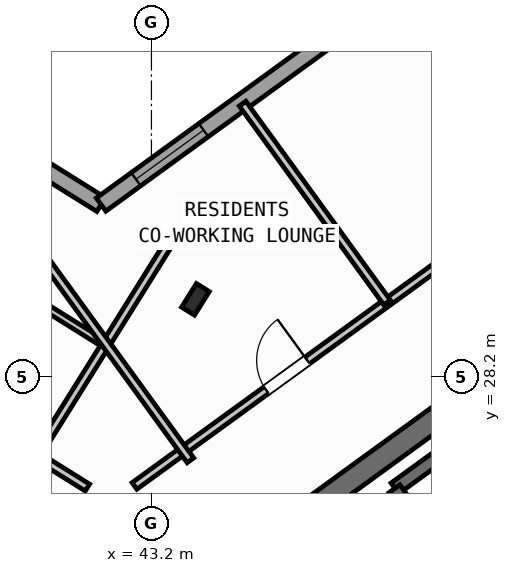
"""IFC4 building model, lengths in metres.
Left out: names, types, materials, properties, quantities, classifications, styles, units other than length and angle.
Written with IfcOpenShell. Run it as: python <this file> out.ifc"""

import sys

from ifc_helpers import new_model, si_unit, direction, frame, frame_2d, origin, origin_2d, place, context, subcontext, project, spatial, rectangle, i_section, extrude, source, transform, mapped, element, fill, save


model = new_model("IFC4")
c1 = context("Model", 3, precision=1e-05, world=origin(), true_north=direction((0.0, 1.0)))
c2 = subcontext(c1, "Body", "Model", "MODEL_VIEW")
j1 = project(units=[si_unit("LENGTHUNIT", "METRE"), si_unit("PLANEANGLEUNIT", "RADIAN")], contexts=[c1])
p1 = place(None, origin())
s1 = spatial("IfcSite", under=j1, at=p1, CompositionType="ELEMENT")
p2 = place(p1, origin())
s2 = spatial("IfcBuilding", under=s1, at=p2, CompositionType="ELEMENT")
p3 = place(p2, frame((0.0, 0.0, 211.2)))
s3 = spatial("IfcBuildingStorey", under=s2, at=p3, CompositionType="ELEMENT", Elevation=211.2)
p4 = place(p3, frame((44.406, 24.172, 0.0), z_axis=(0.0, 0.0, 1.0), x_axis=(0.809012867805, 0.587790931986, 0.0)))
e1 = element("IfcWall", 1, at=p4, inside=s3, PredefinedType="SHEAR", context=c2, shape_type="SweptSolid", body=[
    extrude(rectangle(XDim=12.24, YDim=0.45, at=frame_2d((6.12, 0.0))), origin(), (0.0, 0.0, 1.0), 3.35),
])
m1 = source(origin(), c2, "Body", "SweptSolid", [
    extrude(i_section(OverallWidth=0.3, OverallDepth=0.55, WebThickness=0.015, FlangeThickness=0.029, at=origin_2d()), origin(), (0.0, 0.0, 1.0), 3.6),
])
p5 = place(p3, frame((44.068, 29.726, 0.0), z_axis=(0.0, 0.0, 1.0), x_axis=(-0.848048096156, 0.529919264233, 0.0)))
e2 = element("IfcColumn", 2, at=p5, inside=s3, PredefinedType="COLUMN", context=c2, shape_type="MappedRepresentation", body=[
    mapped(m1, transform((0.0, 0.0, 0.0), scale=1.0)),
])
p6 = place(p3, frame((17.424, 47.083, 0.0), z_axis=(0.0, 0.0, 1.0), x_axis=(0.848049927979, -0.529916332693, 0.0)))
e3 = element("IfcWall", 3, at=p6, inside=s3, PredefinedType="STANDARD", context=c2, shape_type="SweptSolid", body=[
    extrude(rectangle(XDim=29.223, YDim=0.32, at=frame_2d((14.612, 0.0))), origin(), (0.0, 0.0, 1.0), 3.35),
])
p7 = place(p6, frame((2.526, 0.0, 0.0)))
e4 = element("IfcOpeningElement", 4, at=p7, cuts=e3, PredefinedType="OPENING", context=c2, shape_type="SweptSolid", body=[
    extrude(rectangle(XDim=1.05, YDim=2.15, at=frame_2d((0.525, 1.075))), frame((0.0, 0.17, 0.0), z_axis=(0.0, -1.0, 0.0), x_axis=(1.0, 0.0, 0.0)), (0.0, 0.0, 1.0), 0.34),
])
p8 = place(p6, frame((0.653, 0.0, 0.9)))
e5 = element("IfcOpeningElement", 5, at=p8, cuts=e3, PredefinedType="OPENING", context=c2, shape_type="SweptSolid", body=[
    extrude(rectangle(XDim=1.35, YDim=1.45, at=frame_2d((0.675, 0.725))), frame((0.0, 0.17, 0.0), z_axis=(0.0, -1.0, 0.0), x_axis=(1.0, 0.0, 0.0)), (0.0, 0.0, 1.0), 0.34),
])
p9 = place(p6, frame((6.897, 0.0, 1.0)))
e6 = element("IfcOpeningElement", 6, at=p9, cuts=e3, PredefinedType="OPENING", context=c2, shape_type="SweptSolid", body=[
    extrude(rectangle(XDim=0.9, YDim=1.25, at=frame_2d((0.45, 0.625))), frame((0.0, 0.17, 0.0), z_axis=(0.0, -1.0, 0.0), x_axis=(1.0, 0.0, 0.0)), (0.0, 0.0, 1.0), 0.34),
])
p10 = place(p6, frame((9.602, 0.0, 0.95)))
e7 = element("IfcOpeningElement", 7, at=p10, cuts=e3, PredefinedType="OPENING", context=c2, shape_type="SweptSolid", body=[
    extrude(rectangle(XDim=1.95, YDim=1.35, at=frame_2d((0.975, 0.675))), frame((0.0, 0.17, 0.0), z_axis=(0.0, -1.0, 0.0), x_axis=(1.0, 0.0, 0.0)), (0.0, 0.0, 1.0), 0.34),
])
p11 = place(p6, frame((14.096, 0.0, 1.0)))
e8 = element("IfcOpeningElement", 8, at=p11, cuts=e3, PredefinedType="OPENING", context=c2, shape_type="SweptSolid", body=[
    extrude(rectangle(XDim=0.9, YDim=1.25, at=frame_2d((0.45, 0.625))), frame((0.0, 0.17, 0.0), z_axis=(0.0, -1.0, 0.0), x_axis=(1.0, 0.0, 0.0)), (0.0, 0.0, 1.0), 0.34),
])
p12 = place(p6, frame((17.254, 0.0, 1.0)))
e9 = element("IfcOpeningElement", 9, at=p12, cuts=e3, PredefinedType="OPENING", context=c2, shape_type="SweptSolid", body=[
    extrude(rectangle(XDim=0.9, YDim=1.25, at=frame_2d((0.45, 0.625))), frame((0.0, 0.17, 0.0), z_axis=(0.0, -1.0, 0.0), x_axis=(1.0, 0.0, 0.0)), (0.0, 0.0, 1.0), 0.34),
])
p13 = place(p6, frame((21.139, 0.0, 0.9)))
e10 = element("IfcOpeningElement", 10, at=p13, cuts=e3, PredefinedType="OPENING", context=c2, shape_type="SweptSolid", body=[
    extrude(rectangle(XDim=1.35, YDim=1.45, at=frame_2d((0.675, 0.725))), frame((0.0, 0.17, 0.0), z_axis=(0.0, -1.0, 0.0), x_axis=(1.0, 0.0, 0.0)), (0.0, 0.0, 1.0), 0.34),
])
p14 = place(p6, frame((25.778, 0.0, 0.9)))
e11 = element("IfcOpeningElement", 11, at=p14, cuts=e3, PredefinedType="OPENING", context=c2, shape_type="SweptSolid", body=[
    extrude(rectangle(XDim=1.35, YDim=1.45, at=frame_2d((0.675, 0.725))), frame((0.0, 0.17, 0.0), z_axis=(0.0, -1.0, 0.0), x_axis=(1.0, 0.0, 0.0)), (0.0, 0.0, 1.0), 0.34),
])
p15 = place(p3, frame((42.207, 31.597, 0.0), z_axis=(0.0, 0.0, 1.0), x_axis=(0.809020333377, 0.587780656523, 0.0)))
e12 = element("IfcWall", 12, at=p15, inside=s3, PredefinedType="STANDARD", context=c2, shape_type="SweptSolid", body=[
    extrude(rectangle(XDim=15.223, YDim=0.32, at=frame_2d((7.611, 0.0))), origin(), (0.0, 0.0, 1.0), 3.35),
])
p16 = place(p15, frame((12.82, 0.0, 0.0)))
e13 = element("IfcOpeningElement", 13, at=p16, cuts=e12, PredefinedType="OPENING", context=c2, shape_type="SweptSolid", body=[
    extrude(rectangle(XDim=1.05, YDim=2.15, at=frame_2d((0.525, 1.075))), frame((0.0, 0.17, 0.0), z_axis=(0.0, -1.0, 0.0), x_axis=(1.0, 0.0, 0.0)), (0.0, 0.0, 1.0), 0.34),
])
p17 = place(p15, frame((0.85, 0.0, 0.9)))
e14 = element("IfcOpeningElement", 14, at=p17, cuts=e12, PredefinedType="OPENING", context=c2, shape_type="SweptSolid", body=[
    extrude(rectangle(XDim=1.65, YDim=1.45, at=frame_2d((0.825, 0.725))), frame((0.0, 0.17, 0.0), z_axis=(0.0, -1.0, 0.0), x_axis=(1.0, 0.0, 0.0)), (0.0, 0.0, 1.0), 0.34),
])
p18 = place(p15, frame((5.769, 0.0, 0.9)))
e15 = element("IfcOpeningElement", 15, at=p18, cuts=e12, PredefinedType="OPENING", context=c2, shape_type="SweptSolid", body=[
    extrude(rectangle(XDim=1.35, YDim=1.45, at=frame_2d((0.675, 0.725))), frame((0.0, 0.17, 0.0), z_axis=(0.0, -1.0, 0.0), x_axis=(1.0, 0.0, 0.0)), (0.0, 0.0, 1.0), 0.34),
])
p19 = place(p15, frame((10.219, 0.0, 1.0)))
e16 = element("IfcOpeningElement", 16, at=p19, cuts=e12, PredefinedType="OPENING", context=c2, shape_type="SweptSolid", body=[
    extrude(rectangle(XDim=0.9, YDim=1.25, at=frame_2d((0.45, 0.625))), frame((0.0, 0.17, 0.0), z_axis=(0.0, -1.0, 0.0), x_axis=(1.0, 0.0, 0.0)), (0.0, 0.0, 1.0), 0.34),
])
p20 = place(p3, frame((48.006, 25.996, 0.0), z_axis=(0.0, 0.0, 1.0), x_axis=(0.80901903764, 0.587782439969, 0.0)))
e17 = element("IfcWall", 17, at=p20, inside=s3, PredefinedType="SHEAR", context=c2, shape_type="SweptSolid", body=[
    extrude(rectangle(XDim=7.46, YDim=0.26, at=frame_2d((3.73, 0.0))), origin(), (0.0, 0.0, 1.0), 3.35),
])
p21 = place(p3, frame((49.855, 23.434, 0.0), z_axis=(0.0, 0.0, 1.0), x_axis=(-0.58776738483, 0.809029975545, 0.0)))
e18 = element("IfcWall", 18, at=p21, inside=s3, PredefinedType="SHEAR", context=c2, shape_type="SweptSolid", body=[
    extrude(rectangle(XDim=3.16, YDim=0.26, at=frame_2d((1.58, 0.0))), origin(), (0.0, 0.0, 1.0), 3.35),
])
p22 = place(p3, frame((41.936, 26.012, 0.0), z_axis=(0.0, 0.0, 1.0), x_axis=(-0.848051154596, 0.529914369676, 0.0)))
e19 = element("IfcWall", 19, at=p22, inside=s3, PredefinedType="PARTITIONING", context=c2, shape_type="SweptSolid", body=[
    extrude(rectangle(XDim=15.57, YDim=0.16, at=frame_2d((7.785, 0.0))), origin(), (0.0, 0.0, 1.0), 3.34),
])
p23 = place(p22, frame((10.83, 0.0, 0.0)))
e20 = element("IfcOpeningElement", 20, at=p23, cuts=e19, PredefinedType="OPENING", context=c2, shape_type="SweptSolid", body=[
    extrude(rectangle(XDim=1.0, YDim=2.1, at=frame_2d((0.5, 1.05))), frame((0.0, 0.09, 0.0), z_axis=(0.0, -1.0, 0.0), x_axis=(1.0, 0.0, 0.0)), (0.0, 0.0, 1.0), 0.18),
])
p24 = place(p3, frame((43.704, 31.086, 0.0), z_axis=(0.0, 0.0, 1.0), x_axis=(-0.529906828443, -0.848055866774, 0.0)))
e21 = element("IfcWall", 21, at=p24, inside=s3, PredefinedType="PARTITIONING", context=c2, shape_type="SweptSolid", body=[
    extrude(rectangle(XDim=5.48, YDim=0.16, at=frame_2d((2.74, 0.0))), origin(), (0.0, 0.0, 1.0), 3.34),
])
p25 = place(p3, frame((42.226, 28.873, 0.0), z_axis=(0.0, 0.0, 1.0), x_axis=(-0.848049134363, 0.529917602752, 0.0)))
e22 = element("IfcWall", 22, at=p25, inside=s3, PredefinedType="PLUMBINGWALL", context=c2, shape_type="SweptSolid", body=[
    extrude(rectangle(XDim=14.3, YDim=0.14, at=frame_2d((7.15, 0.0))), origin(), (0.0, 0.0, 1.0), 3.34),
])
p26 = place(p25, frame((9.57, 0.0, 0.0)))
e23 = element("IfcOpeningElement", 23, at=p26, cuts=e22, PredefinedType="OPENING", context=c2, shape_type="SweptSolid", body=[
    extrude(rectangle(XDim=0.92, YDim=2.08, at=frame_2d((0.46, 1.04))), frame((0.0, 0.08, 0.0), z_axis=(0.0, -1.0, 0.0), x_axis=(1.0, 0.0, 0.0)), (0.0, 0.0, 1.0), 0.16),
])
p27 = place(p3, frame((42.866, 26.044, 0.0), z_axis=(0.0, 0.0, 1.0), x_axis=(0.809020254154, 0.587780765566, 0.0)))
e24 = element("IfcWall", 24, at=p27, inside=s3, PredefinedType="PARTITIONING", context=c2, shape_type="SweptSolid", body=[
    extrude(rectangle(XDim=14.67, YDim=0.16, at=frame_2d((7.335, 0.0))), origin(), (0.0, 0.0, 1.0), 3.34),
])
p28 = place(p27, frame((3.215, 0.0, 0.0)))
e25 = element("IfcOpeningElement", 25, at=p28, cuts=e24, PredefinedType="OPENING", context=c2, shape_type="SweptSolid", body=[
    extrude(rectangle(XDim=1.0, YDim=2.1, at=frame_2d((0.5, 1.05))), frame((0.0, 0.09, 0.0), z_axis=(0.0, -1.0, 0.0), x_axis=(1.0, 0.0, 0.0)), (0.0, 0.0, 1.0), 0.18),
])
p29 = place(p27, frame((9.915, 0.0, 0.0)))
e26 = element("IfcOpeningElement", 26, at=p29, cuts=e24, PredefinedType="OPENING", context=c2, shape_type="SweptSolid", body=[
    extrude(rectangle(XDim=1.0, YDim=2.1, at=frame_2d((0.5, 1.05))), frame((0.0, 0.09, 0.0), z_axis=(0.0, -1.0, 0.0), x_axis=(1.0, 0.0, 0.0)), (0.0, 0.0, 1.0), 0.18),
])
p30 = place(p3, frame((43.969, 26.55, 0.0), z_axis=(0.0, 0.0, 1.0), x_axis=(-0.587776919386, 0.80902304852, 0.0)))
e27 = element("IfcWall", 27, at=p30, inside=s3, PredefinedType="PARTITIONING", context=c2, shape_type="SweptSolid", body=[
    extrude(rectangle(XDim=5.48, YDim=0.16, at=frame_2d((2.74, 0.0))), origin(), (0.0, 0.0, 1.0), 3.34),
])
p31 = place(p3, frame((47.849, 29.665, 0.0), z_axis=(0.0, 0.0, 1.0), x_axis=(-0.587785532001, 0.809016791155, 0.0)))
e28 = element("IfcWall", 28, at=p31, inside=s3, PredefinedType="PARTITIONING", context=c2, shape_type="SweptSolid", body=[
    extrude(rectangle(XDim=4.85, YDim=0.16, at=frame_2d((2.425, 0.0))), origin(), (0.0, 0.0, 1.0), 3.34),
])
m2 = source(origin(), c2, "Body", "SweptSolid", [
    extrude(rectangle(XDim=1.65, YDim=1.45, at=frame_2d((0.825, 0.725))), frame((0.0, 0.03, 0.0), z_axis=(0.0, -1.0, 0.0), x_axis=(1.0, 0.0, 0.0)), (0.0, 0.0, 1.0), 0.06),
])
p32 = place(p17, origin())
e29 = element("IfcWindow", 29, at=p32, inside=s3, PartitioningType="SINGLE_PANEL", PredefinedType="WINDOW", context=c2, shape_type="MappedRepresentation", body=[
    mapped(m2, transform((0.0, 0.0, 0.0), scale=1.0)),
])
fill(e14, e29)
m3 = source(origin(), c2, "Body", "SweptSolid", [
    extrude(rectangle(XDim=1.0, YDim=2.1, at=frame_2d((0.5, 1.05))), frame((0.0, 0.025, 0.0), z_axis=(0.0, -1.0, 0.0), x_axis=(1.0, 0.0, 0.0)), (0.0, 0.0, 1.0), 0.05),
])
p33 = place(p28, origin())
e30 = element("IfcDoor", 30, at=p33, inside=s3, OperationType="SINGLE_SWING_RIGHT", PredefinedType="DOOR", context=c2, shape_type="MappedRepresentation", body=[
    mapped(m3, transform((0.0, 0.0, 0.0), scale=1.0)),
])
fill(e25, e30)
save(model, sys.argv[1])
